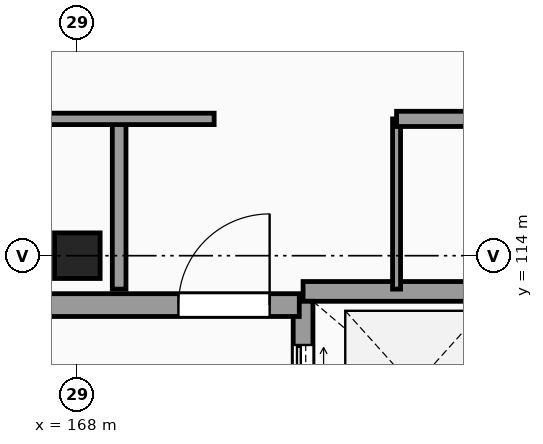
"""IFC4 building model, lengths in metres.
Left out: names, types, materials, properties, quantities, classifications, styles, units other than length and angle.
Written with IfcOpenShell. Run it as: python <this file> out.ifc"""

import sys

from ifc_helpers import new_model, si_unit, direction, frame, frame_2d, origin, origin_2d, place, context, subcontext, project, spatial, rectangle, extrude, element, fill, save


model = new_model("IFC4")
c1 = context("Model", 3, precision=1e-05, world=origin(), true_north=direction((0.0, 1.0)))
c2 = subcontext(c1, "Body", "Model", "MODEL_VIEW")
j1 = project(units=[si_unit("LENGTHUNIT", "METRE"), si_unit("PLANEANGLEUNIT", "RADIAN")], contexts=[c1])
p1 = place(None, origin())
s1 = spatial("IfcSite", under=j1, at=p1, CompositionType="ELEMENT")
p2 = place(p1, origin())
s2 = spatial("IfcBuilding", under=s1, at=p2, CompositionType="ELEMENT")
p3 = place(p2, frame((0.0, 0.0, 28.2)))
s3 = spatial("IfcBuildingStorey", under=s2, at=p3, CompositionType="ELEMENT", Elevation=28.2)
p4 = place(p3, frame((168.0, 114.0, 0.0), z_axis=(0.0, 0.0, 1.0), x_axis=(1.0, 0.0, 0.0)))
e1 = element("IfcColumn", 1, at=p4, inside=s3, PredefinedType="COLUMN", context=c2, shape_type="SweptSolid", body=[
    extrude(rectangle(XDim=0.6, YDim=0.6, at=origin_2d()), origin(), (0.0, 0.0, 1.0), 3.3),
])
p5 = place(p3, frame((170.97, 113.53, 0.0), z_axis=(0.0, 0.0, 1.0), x_axis=(1.0, 0.0, 0.0)))
e2 = element("IfcWall", 2, at=p5, inside=s3, PredefinedType="SHEAR", context=c2, shape_type="SweptSolid", body=[
    extrude(rectangle(XDim=2.91, YDim=0.26, at=frame_2d((1.455, 0.0))), origin(), (0.0, 0.0, 1.0), 3.3),
])
p6 = place(p3, frame((170.97, 111.15, 0.0), z_axis=(0.0, 0.0, 1.0), x_axis=(0.0, 1.0, 0.0)))
e3 = element("IfcWall", 3, at=p6, inside=s3, PredefinedType="SHEAR", context=c2, shape_type="SweptSolid", body=[
    extrude(rectangle(XDim=2.25, YDim=0.26, at=frame_2d((1.125, 0.0))), origin(), (0.0, 0.0, 1.0), 3.3),
])
p7 = place(p6, frame((0.575, 0.0, 0.0)))
e4 = element("IfcOpeningElement", 4, at=p7, cuts=e3, PredefinedType="OPENING", context=c2, shape_type="SweptSolid", body=[
    extrude(rectangle(XDim=1.1, YDim=2.2, at=frame_2d((0.55, 1.1))), frame((0.0, 0.14, 0.0), z_axis=(0.0, -1.0, 0.0), x_axis=(1.0, 0.0, 0.0)), (0.0, 0.0, 1.0), 0.28),
])
p8 = place(p3, frame((166.68, 113.35, 0.0), z_axis=(0.0, 0.0, 1.0), x_axis=(1.0, 0.0, 0.0)))
e5 = element("IfcWall", 5, at=p8, inside=s3, PredefinedType="SHEAR", context=c2, shape_type="SweptSolid", body=[
    extrude(rectangle(XDim=4.24, YDim=0.3, at=frame_2d((2.12, 0.0))), origin(), (0.0, 0.0, 1.0), 3.3),
])
p9 = place(p8, frame((2.65, 0.0, 0.0)))
e6 = element("IfcOpeningElement", 6, at=p9, cuts=e5, PredefinedType="OPENING", context=c2, shape_type="SweptSolid", body=[
    extrude(rectangle(XDim=1.2, YDim=2.2, at=frame_2d((0.6, 1.1))), frame((0.0, 0.16, 0.0), z_axis=(0.0, -1.0, 0.0), x_axis=(1.0, 0.0, 0.0)), (0.0, 0.0, 1.0), 0.32),
])
p10 = place(p3, frame((168.55, 113.56, 0.0), z_axis=(0.0, 0.0, 1.0), x_axis=(0.0, 1.0, 0.0)))
e7 = element("IfcWall", 7, at=p10, inside=s3, PredefinedType="PARTITIONING", context=c2, shape_type="SweptSolid", body=[
    extrude(rectangle(XDim=2.24, YDim=0.18, at=frame_2d((1.12, 0.0))), origin(), (0.0, 0.0, 1.0), 3.08),
])
p11 = place(p3, frame((172.2, 113.56, 0.0), z_axis=(0.0, 0.0, 1.0), x_axis=(0.0, 1.0, 0.0)))
e8 = element("IfcWall", 8, at=p11, inside=s3, PredefinedType="PARTITIONING", context=c2, shape_type="SweptSolid", body=[
    extrude(rectangle(XDim=2.24, YDim=0.105, at=frame_2d((1.12, 0.0))), origin(), (0.0, 0.0, 1.0), 3.08),
])
p12 = place(p3, frame((66.235, 115.8, 0.0), z_axis=(0.0, 0.0, 1.0), x_axis=(1.0, 0.0, 0.0)))
e9 = element("IfcWall", 9, at=p12, inside=s3, PredefinedType="PARTITIONING", context=c2, shape_type="SweptSolid", body=[
    extrude(rectangle(XDim=103.565, YDim=0.15, at=frame_2d((51.782, 0.0))), origin(), (0.0, 0.0, 1.0), 3.08),
])
p13 = place(p12, frame((80.165, 0.0, 0.0)))
e10 = element("IfcOpeningElement", 10, at=p13, cuts=e9, PredefinedType="OPENING", context=c2, shape_type="SweptSolid", body=[
    extrude(rectangle(XDim=1.2, YDim=2.2, at=frame_2d((0.6, 1.1))), frame((0.0, 0.085, 0.0), z_axis=(0.0, -1.0, 0.0), x_axis=(1.0, 0.0, 0.0)), (0.0, 0.0, 1.0), 0.17),
])
p14 = place(p12, frame((50.165, 0.0, 0.0)))
e11 = element("IfcOpeningElement", 11, at=p14, cuts=e9, PredefinedType="OPENING", context=c2, shape_type="SweptSolid", body=[
    extrude(rectangle(XDim=1.2, YDim=2.2, at=frame_2d((0.6, 1.1))), frame((0.0, 0.085, 0.0), z_axis=(0.0, -1.0, 0.0), x_axis=(1.0, 0.0, 0.0)), (0.0, 0.0, 1.0), 0.17),
])
p15 = place(p12, frame((9.015, 0.0, 0.0)))
e12 = element("IfcOpeningElement", 12, at=p15, cuts=e9, PredefinedType="OPENING", context=c2, shape_type="SweptSolid", body=[
    extrude(rectangle(XDim=1.1, YDim=2.15, at=frame_2d((0.55, 1.075))), frame((0.0, 0.085, 0.0), z_axis=(0.0, -1.0, 0.0), x_axis=(1.0, 0.0, 0.0)), (0.0, 0.0, 1.0), 0.17),
])
p16 = place(p12, frame((55.315, 0.0, 0.0)))
e13 = element("IfcOpeningElement", 13, at=p16, cuts=e9, PredefinedType="OPENING", context=c2, shape_type="SweptSolid", body=[
    extrude(rectangle(XDim=1.0, YDim=2.15, at=frame_2d((0.5, 1.075))), frame((0.0, 0.085, 0.0), z_axis=(0.0, -1.0, 0.0), x_axis=(1.0, 0.0, 0.0)), (0.0, 0.0, 1.0), 0.17),
])
p17 = place(p12, frame((62.285, 0.0, 0.0)))
e14 = element("IfcOpeningElement", 14, at=p17, cuts=e9, PredefinedType="OPENING", context=c2, shape_type="SweptSolid", body=[
    extrude(rectangle(XDim=0.96, YDim=2.15, at=frame_2d((0.48, 1.075))), frame((0.0, 0.085, 0.0), z_axis=(0.0, -1.0, 0.0), x_axis=(1.0, 0.0, 0.0)), (0.0, 0.0, 1.0), 0.17),
])
p18 = place(p12, frame((31.965, 0.0, 0.0)))
e15 = element("IfcOpeningElement", 15, at=p18, cuts=e9, PredefinedType="OPENING", context=c2, shape_type="SweptSolid", body=[
    extrude(rectangle(XDim=1.6, YDim=2.25, at=frame_2d((0.8, 1.125))), frame((0.0, 0.085, 0.0), z_axis=(0.0, -1.0, 0.0), x_axis=(1.0, 0.0, 0.0)), (0.0, 0.0, 1.0), 0.17),
])
p19 = place(p12, frame((18.59, 0.0, 0.0)))
e16 = element("IfcOpeningElement", 16, at=p19, cuts=e9, PredefinedType="OPENING", context=c2, shape_type="SweptSolid", body=[
    extrude(rectangle(XDim=0.95, YDim=2.1, at=frame_2d((0.475, 1.05))), frame((0.0, 0.085, 0.0), z_axis=(0.0, -1.0, 0.0), x_axis=(1.0, 0.0, 0.0)), (0.0, 0.0, 1.0), 0.17),
])
p20 = place(p12, frame((24.59, 0.0, 0.0)))
e17 = element("IfcOpeningElement", 17, at=p20, cuts=e9, PredefinedType="OPENING", context=c2, shape_type="SweptSolid", body=[
    extrude(rectangle(XDim=0.95, YDim=2.1, at=frame_2d((0.475, 1.05))), frame((0.0, 0.085, 0.0), z_axis=(0.0, -1.0, 0.0), x_axis=(1.0, 0.0, 0.0)), (0.0, 0.0, 1.0), 0.17),
])
p21 = place(p12, frame((84.49, 0.0, 0.0)))
e18 = element("IfcOpeningElement", 18, at=p21, cuts=e9, PredefinedType="OPENING", context=c2, shape_type="SweptSolid", body=[
    extrude(rectangle(XDim=0.95, YDim=2.1, at=frame_2d((0.475, 1.05))), frame((0.0, 0.085, 0.0), z_axis=(0.0, -1.0, 0.0), x_axis=(1.0, 0.0, 0.0)), (0.0, 0.0, 1.0), 0.17),
])
p22 = place(p3, frame((172.2, 115.8, 0.0), z_axis=(0.0, 0.0, 1.0), x_axis=(1.0, 0.0, 0.0)))
e19 = element("IfcWall", 19, at=p22, inside=s3, PredefinedType="PARTITIONING", context=c2, shape_type="SweptSolid", body=[
    extrude(rectangle(XDim=4.3, YDim=0.2, at=frame_2d((2.15, 0.0))), origin(), (0.0, 0.0, 1.0), 3.08),
])
p23 = place(p22, frame((2.62, 0.0, 0.0)))
e20 = element("IfcOpeningElement", 20, at=p23, cuts=e19, PredefinedType="OPENING", context=c2, shape_type="SweptSolid", body=[
    extrude(rectangle(XDim=0.96, YDim=2.15, at=frame_2d((0.48, 1.075))), frame((0.0, 0.11, 0.0), z_axis=(0.0, -1.0, 0.0), x_axis=(1.0, 0.0, 0.0)), (0.0, 0.0, 1.0), 0.22),
])
p24 = place(p7, origin())
e21 = element("IfcDoor", 21, at=p24, inside=s3, OperationType="DOUBLE_DOOR_SLIDING", PredefinedType="DOOR", context=c2, shape_type="SweptSolid", body=[
    extrude(rectangle(XDim=1.1, YDim=2.2, at=frame_2d((0.55, 1.1))), frame((0.0, 0.025, 0.0), z_axis=(0.0, -1.0, 0.0), x_axis=(1.0, 0.0, 0.0)), (0.0, 0.0, 1.0), 0.05),
])
fill(e4, e21)
p25 = place(p9, origin())
e22 = element("IfcDoor", 22, at=p25, inside=s3, OperationType="SINGLE_SWING_RIGHT", PredefinedType="DOOR", context=c2, shape_type="SweptSolid", body=[
    extrude(rectangle(XDim=1.2, YDim=2.2, at=frame_2d((0.6, 1.1))), frame((0.0, 0.025, 0.0), z_axis=(0.0, -1.0, 0.0), x_axis=(1.0, 0.0, 0.0)), (0.0, 0.0, 1.0), 0.05),
])
fill(e6, e22)
save(model, sys.argv[1])
